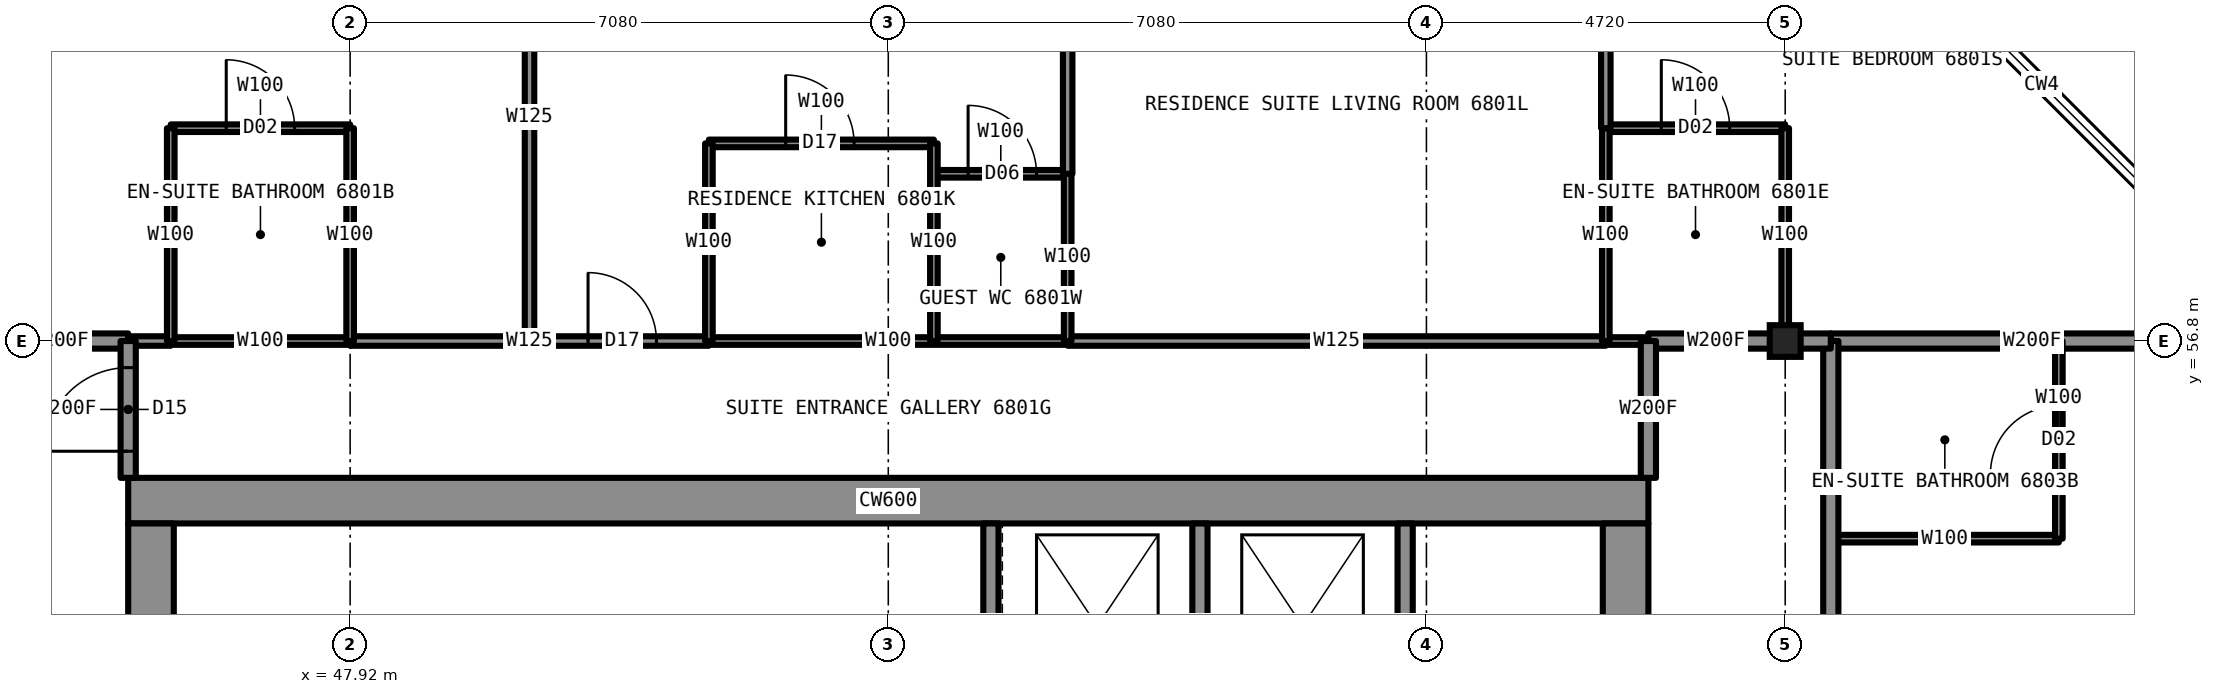
"""IFC4 building model, lengths in metres.
Left out: names, types, materials, properties, quantities, classifications, styles, units other than length and angle.
Written with IfcOpenShell. Run it as: python <this file> out.ifc"""

import sys

from ifc_helpers import new_model, si_unit, direction, frame, frame_2d, origin, origin_2d, place, context, subcontext, project, spatial, rectangle, i_section, extrude, element, fill, save


model = new_model("IFC4")
c1 = context("Model", 3, precision=1e-05, world=origin(), true_north=direction((0.0, 1.0)))
c2 = subcontext(c1, "Body", "Model", "MODEL_VIEW")
j1 = project(units=[si_unit("LENGTHUNIT", "METRE"), si_unit("PLANEANGLEUNIT", "RADIAN")], contexts=[c1])
p1 = place(None, origin())
s1 = spatial("IfcSite", under=j1, at=p1, CompositionType="ELEMENT")
p2 = place(p1, origin())
s2 = spatial("IfcBuilding", under=s1, at=p2, CompositionType="ELEMENT")
p3 = place(p2, frame((0.0, 0.0, 247.7)))
s3 = spatial("IfcBuildingStorey", under=s2, at=p3, CompositionType="ELEMENT", Elevation=247.7)
p4 = place(p3, frame((66.8, 56.8, 0.0), z_axis=(0.0, 0.0, 1.0), x_axis=(1.0, 0.0, 0.0)))
e1 = element("IfcColumn", 1, at=p4, inside=s3, PredefinedType="COLUMN", context=c2, shape_type="SweptSolid", body=[
    extrude(i_section(OverallWidth=0.406, OverallDepth=0.417, WebThickness=0.03, FlangeThickness=0.048, at=origin_2d()), origin(), (0.0, 0.0, 1.0), 3.5),
])
p5 = place(p3, frame((45.0, 54.7, 0.0), z_axis=(0.0, 0.0, 1.0), x_axis=(1.0, 0.0, 0.0)))
e2 = element("IfcWall", 2, at=p5, inside=s3, PredefinedType="SHEAR", context=c2, shape_type="SweptSolid", body=[
    extrude(rectangle(XDim=20.0, YDim=0.6, at=frame_2d((10.0, 0.0))), origin(), (0.0, 0.0, 1.0), 3.5),
])
p6 = place(p3, frame((64.7, 35.6, 0.0), z_axis=(0.0, 0.0, 1.0), x_axis=(0.0, 1.0, 0.0)))
e3 = element("IfcWall", 3, at=p6, inside=s3, PredefinedType="SHEAR", context=c2, shape_type="SweptSolid", body=[
    extrude(rectangle(XDim=18.8, YDim=0.6, at=frame_2d((9.4, 0.0))), origin(), (0.0, 0.0, 1.0), 3.5),
])
p7 = place(p6, frame((13.4, 0.0, 0.0)))
e4 = element("IfcOpeningElement", 4, at=p7, cuts=e3, PredefinedType="OPENING", context=c2, shape_type="SweptSolid", body=[
    extrude(rectangle(XDim=1.8, YDim=2.2, at=frame_2d((0.9, 1.1))), frame((0.0, 0.31, 0.0), z_axis=(0.0, -1.0, 0.0), x_axis=(1.0, 0.0, 0.0)), (0.0, 0.0, 1.0), 0.62),
])
p8 = place(p6, frame((3.6, 0.0, 0.0)))
e5 = element("IfcOpeningElement", 5, at=p8, cuts=e3, PredefinedType="OPENING", context=c2, shape_type="SweptSolid", body=[
    extrude(rectangle(XDim=1.8, YDim=2.2, at=frame_2d((0.9, 1.1))), frame((0.0, 0.31, 0.0), z_axis=(0.0, -1.0, 0.0), x_axis=(1.0, 0.0, 0.0)), (0.0, 0.0, 1.0), 0.62),
])
p9 = place(p3, frame((45.3, 35.6, 0.0), z_axis=(0.0, 0.0, 1.0), x_axis=(0.0, 1.0, 0.0)))
e6 = element("IfcWall", 6, at=p9, inside=s3, PredefinedType="SHEAR", context=c2, shape_type="SweptSolid", body=[
    extrude(rectangle(XDim=18.8, YDim=0.6, at=frame_2d((9.4, 0.0))), origin(), (0.0, 0.0, 1.0), 3.5),
])
p10 = place(p9, frame((13.4, 0.0, 0.0)))
e7 = element("IfcOpeningElement", 7, at=p10, cuts=e6, PredefinedType="OPENING", context=c2, shape_type="SweptSolid", body=[
    extrude(rectangle(XDim=1.8, YDim=2.2, at=frame_2d((0.9, 1.1))), frame((0.0, 0.31, 0.0), z_axis=(0.0, -1.0, 0.0), x_axis=(1.0, 0.0, 0.0)), (0.0, 0.0, 1.0), 0.62),
])
p11 = place(p9, frame((3.6, 0.0, 0.0)))
e8 = element("IfcOpeningElement", 8, at=p11, cuts=e6, PredefinedType="OPENING", context=c2, shape_type="SweptSolid", body=[
    extrude(rectangle(XDim=1.8, YDim=2.2, at=frame_2d((0.9, 1.1))), frame((0.0, 0.31, 0.0), z_axis=(0.0, -1.0, 0.0), x_axis=(1.0, 0.0, 0.0)), (0.0, 0.0, 1.0), 0.62),
])
p12 = place(p9, frame((6.4, 0.0, 0.0)))
e9 = element("IfcOpeningElement", 9, at=p12, cuts=e6, PredefinedType="OPENING", context=c2, shape_type="SweptSolid", body=[
    extrude(rectangle(XDim=1.2, YDim=2.2, at=frame_2d((0.6, 1.1))), frame((0.0, 0.31, 0.0), z_axis=(0.0, -1.0, 0.0), x_axis=(1.0, 0.0, 0.0)), (0.0, 0.0, 1.0), 0.62),
])
p13 = place(p3, frame((45.56, 56.8, 0.0), z_axis=(0.0, 0.0, 1.0), x_axis=(1.0, 0.0, 0.0)))
e10 = element("IfcWall", 10, at=p13, inside=s3, PredefinedType="PARTITIONING", context=c2, shape_type="SweptSolid", body=[
    extrude(rectangle(XDim=2.36, YDim=0.1, at=frame_2d((1.18, 0.0))), origin(), (0.0, 0.0, 1.0), 3.33),
])
p14 = place(p3, frame((52.64, 56.8, 0.0), z_axis=(0.0, 0.0, 1.0), x_axis=(1.0, 0.0, 0.0)))
e11 = element("IfcWall", 11, at=p14, inside=s3, PredefinedType="PARTITIONING", context=c2, shape_type="SweptSolid", body=[
    extrude(rectangle(XDim=4.72, YDim=0.1, at=frame_2d((2.36, 0.0))), origin(), (0.0, 0.0, 1.0), 3.33),
])
p15 = place(p3, frame((64.44, 56.8, 0.0), z_axis=(0.0, 0.0, 1.0), x_axis=(1.0, 0.0, 0.0)))
e12 = element("IfcWall", 12, at=p15, inside=s3, PredefinedType="PARTITIONING", context=c2, shape_type="SweptSolid", body=[
    extrude(rectangle(XDim=0.56, YDim=0.1, at=frame_2d((0.28, 0.0))), origin(), (0.0, 0.0, 1.0), 3.33),
])
p16 = place(p3, frame((43.2, 56.8, 0.0), z_axis=(0.0, 0.0, 1.0), x_axis=(1.0, 0.0, 0.0)))
e13 = element("IfcWall", 13, at=p16, inside=s3, PredefinedType="PARTITIONING", context=c2, shape_type="SweptSolid", body=[
    extrude(rectangle(XDim=1.8, YDim=0.2, at=frame_2d((0.9, 0.0))), origin(), (0.0, 0.0, 1.0), 3.33),
])
p17 = place(p3, frame((65.0, 56.8, 0.0), z_axis=(0.0, 0.0, 1.0), x_axis=(1.0, 0.0, 0.0)))
e14 = element("IfcWall", 14, at=p17, inside=s3, PredefinedType="PARTITIONING", context=c2, shape_type="SweptSolid", body=[
    extrude(rectangle(XDim=1.78, YDim=0.2, at=frame_2d((0.89, 0.0))), origin(), (0.0, 0.0, 1.0), 3.33),
])
p18 = place(p3, frame((67.4, 56.8, 0.0), z_axis=(0.0, 0.0, 1.0), x_axis=(1.0, 0.0, 0.0)))
e15 = element("IfcWall", 15, at=p18, inside=s3, PredefinedType="PARTITIONING", context=c2, shape_type="SweptSolid", body=[
    extrude(rectangle(XDim=5.3, YDim=0.2, at=frame_2d((2.65, 0.0))), origin(), (0.0, 0.0, 1.0), 2.573),
])
p19 = place(p3, frame((45.0, 56.8, 0.0), z_axis=(0.0, 0.0, 1.0), x_axis=(1.0, 0.0, 0.0)))
e16 = element("IfcWall", 16, at=p19, inside=s3, PredefinedType="PARTITIONING", context=c2, shape_type="SweptSolid", body=[
    extrude(rectangle(XDim=0.56, YDim=0.125, at=frame_2d((0.28, 0.0))), origin(), (0.0, 0.0, 1.0), 3.33),
])
p20 = place(p3, frame((47.92, 56.8, 0.0), z_axis=(0.0, 0.0, 1.0), x_axis=(1.0, 0.0, 0.0)))
e17 = element("IfcWall", 17, at=p20, inside=s3, PredefinedType="PARTITIONING", context=c2, shape_type="SweptSolid", body=[
    extrude(rectangle(XDim=4.72, YDim=0.125, at=frame_2d((2.36, 0.0))), origin(), (0.0, 0.0, 1.0), 3.33),
])
p21 = place(p20, frame((3.13, 0.0, 0.0)))
e18 = element("IfcOpeningElement", 18, at=p21, cuts=e17, PredefinedType="OPENING", context=c2, shape_type="SweptSolid", body=[
    extrude(rectangle(XDim=0.9, YDim=2.2, at=frame_2d((0.45, 1.1))), frame((0.0, 0.073, 0.0), z_axis=(0.0, -1.0, 0.0), x_axis=(1.0, 0.0, 0.0)), (0.0, 0.0, 1.0), 0.145),
])
p22 = place(p3, frame((57.36, 56.8, 0.0), z_axis=(0.0, 0.0, 1.0), x_axis=(1.0, 0.0, 0.0)))
e19 = element("IfcWall", 19, at=p22, inside=s3, PredefinedType="PARTITIONING", context=c2, shape_type="SweptSolid", body=[
    extrude(rectangle(XDim=7.08, YDim=0.125, at=frame_2d((3.54, 0.0))), origin(), (0.0, 0.0, 1.0), 3.33),
])
p23 = place(p3, frame((55.6, 59.0, 0.0), z_axis=(0.0, 0.0, 1.0), x_axis=(1.0, 0.0, 0.0)))
e20 = element("IfcWall", 20, at=p23, inside=s3, PredefinedType="PARTITIONING", context=c2, shape_type="SweptSolid", body=[
    extrude(rectangle(XDim=1.76, YDim=0.1, at=frame_2d((0.88, 0.0))), origin(), (0.0, 0.0, 1.0), 3.33),
])
p24 = place(p23, frame((0.45, 0.0, 0.0)))
e21 = element("IfcOpeningElement", 21, at=p24, cuts=e20, PredefinedType="OPENING", context=c2, shape_type="SweptSolid", body=[
    extrude(rectangle(XDim=0.9, YDim=2.1, at=frame_2d((0.45, 1.05))), frame((0.0, 0.06, 0.0), z_axis=(0.0, -1.0, 0.0), x_axis=(1.0, 0.0, 0.0)), (0.0, 0.0, 1.0), 0.12),
])
p25 = place(p3, frame((52.64, 59.4, 0.0), z_axis=(0.0, 0.0, 1.0), x_axis=(1.0, 0.0, 0.0)))
e22 = element("IfcWall", 22, at=p25, inside=s3, PredefinedType="PARTITIONING", context=c2, shape_type="SweptSolid", body=[
    extrude(rectangle(XDim=2.96, YDim=0.1, at=frame_2d((1.48, 0.0))), origin(), (0.0, 0.0, 1.0), 3.33),
])
p26 = place(p25, frame((1.01, 0.0, 0.0)))
e23 = element("IfcOpeningElement", 23, at=p26, cuts=e22, PredefinedType="OPENING", context=c2, shape_type="SweptSolid", body=[
    extrude(rectangle(XDim=0.9, YDim=2.2, at=frame_2d((0.45, 1.1))), frame((0.0, 0.06, 0.0), z_axis=(0.0, -1.0, 0.0), x_axis=(1.0, 0.0, 0.0)), (0.0, 0.0, 1.0), 0.12),
])
p27 = place(p3, frame((45.56, 59.6, 0.0), z_axis=(0.0, 0.0, 1.0), x_axis=(1.0, 0.0, 0.0)))
e24 = element("IfcWall", 24, at=p27, inside=s3, PredefinedType="PARTITIONING", context=c2, shape_type="SweptSolid", body=[
    extrude(rectangle(XDim=2.36, YDim=0.1, at=frame_2d((1.18, 0.0))), origin(), (0.0, 0.0, 1.0), 3.33),
])
p28 = place(p27, frame((0.73, 0.0, 0.0)))
e25 = element("IfcOpeningElement", 25, at=p28, cuts=e24, PredefinedType="OPENING", context=c2, shape_type="SweptSolid", body=[
    extrude(rectangle(XDim=0.9, YDim=2.1, at=frame_2d((0.45, 1.05))), frame((0.0, 0.06, 0.0), z_axis=(0.0, -1.0, 0.0), x_axis=(1.0, 0.0, 0.0)), (0.0, 0.0, 1.0), 0.12),
])
p29 = place(p3, frame((64.44, 59.6, 0.0), z_axis=(0.0, 0.0, 1.0), x_axis=(1.0, 0.0, 0.0)))
e26 = element("IfcWall", 26, at=p29, inside=s3, PredefinedType="PARTITIONING", context=c2, shape_type="SweptSolid", body=[
    extrude(rectangle(XDim=2.36, YDim=0.1, at=frame_2d((1.18, 0.0))), origin(), (0.0, 0.0, 1.0), 3.33),
])
p30 = place(p29, frame((0.73, 0.0, 0.0)))
e27 = element("IfcOpeningElement", 27, at=p30, cuts=e26, PredefinedType="OPENING", context=c2, shape_type="SweptSolid", body=[
    extrude(rectangle(XDim=0.9, YDim=2.1, at=frame_2d((0.45, 1.05))), frame((0.0, 0.06, 0.0), z_axis=(0.0, -1.0, 0.0), x_axis=(1.0, 0.0, 0.0)), (0.0, 0.0, 1.0), 0.12),
])
p31 = place(p3, frame((67.4, 54.2, 0.0), z_axis=(0.0, 0.0, 1.0), x_axis=(1.0, 0.0, 0.0)))
e28 = element("IfcWall", 28, at=p31, inside=s3, PredefinedType="PARTITIONING", context=c2, shape_type="SweptSolid", body=[
    extrude(rectangle(XDim=3.0, YDim=0.1, at=frame_2d((1.5, 0.0))), origin(), (0.0, 0.0, 1.0), 3.33),
])
p32 = place(p3, frame((45.0, 55.0, 0.0), z_axis=(0.0, 0.0, 1.0), x_axis=(0.0, 1.0, 0.0)))
e29 = element("IfcWall", 29, at=p32, inside=s3, PredefinedType="PARTITIONING", context=c2, shape_type="SweptSolid", body=[
    extrude(rectangle(XDim=1.8, YDim=0.2, at=frame_2d((0.9, 0.0))), origin(), (0.0, 0.0, 1.0), 3.33),
])
p33 = place(p32, frame((0.35, 0.0, 0.0)))
e30 = element("IfcOpeningElement", 30, at=p33, cuts=e29, PredefinedType="OPENING", context=c2, shape_type="SweptSolid", body=[
    extrude(rectangle(XDim=1.1, YDim=2.2, at=frame_2d((0.55, 1.1))), frame((0.0, 0.11, 0.0), z_axis=(0.0, -1.0, 0.0), x_axis=(1.0, 0.0, 0.0)), (0.0, 0.0, 1.0), 0.22),
])
p34 = place(p3, frame((52.64, 56.8, 0.0), z_axis=(0.0, 0.0, 1.0), x_axis=(0.0, 1.0, 0.0)))
e31 = element("IfcWall", 31, at=p34, inside=s3, PredefinedType="PARTITIONING", context=c2, shape_type="SweptSolid", body=[
    extrude(rectangle(XDim=2.6, YDim=0.1, at=frame_2d((1.3, 0.0))), origin(), (0.0, 0.0, 1.0), 3.33),
])
p35 = place(p3, frame((50.28, 56.8, 0.0), z_axis=(0.0, 0.0, 1.0), x_axis=(0.0, 1.0, 0.0)))
e32 = element("IfcWall", 32, at=p35, inside=s3, PredefinedType="PARTITIONING", context=c2, shape_type="SweptSolid", body=[
    extrude(rectangle(XDim=5.9, YDim=0.125, at=frame_2d((2.95, 0.0))), origin(), (0.0, 0.0, 1.0), 3.33),
])
p36 = place(p35, frame((4.05, 0.0, 0.0)))
e33 = element("IfcOpeningElement", 33, at=p36, cuts=e32, PredefinedType="OPENING", context=c2, shape_type="SweptSolid", body=[
    extrude(rectangle(XDim=0.9, YDim=2.2, at=frame_2d((0.45, 1.1))), frame((0.0, 0.073, 0.0), z_axis=(0.0, -1.0, 0.0), x_axis=(1.0, 0.0, 0.0)), (0.0, 0.0, 1.0), 0.145),
])
p37 = place(p3, frame((47.92, 56.8, 0.0), z_axis=(0.0, 0.0, 1.0), x_axis=(0.0, 1.0, 0.0)))
e34 = element("IfcWall", 34, at=p37, inside=s3, PredefinedType="PARTITIONING", context=c2, shape_type="SweptSolid", body=[
    extrude(rectangle(XDim=2.8, YDim=0.1, at=frame_2d((1.4, 0.0))), origin(), (0.0, 0.0, 1.0), 2.573),
])
p38 = place(p3, frame((45.56, 56.8, 0.0), z_axis=(0.0, 0.0, 1.0), x_axis=(0.0, 1.0, 0.0)))
e35 = element("IfcWall", 35, at=p38, inside=s3, PredefinedType="PARTITIONING", context=c2, shape_type="SweptSolid", body=[
    extrude(rectangle(XDim=2.8, YDim=0.1, at=frame_2d((1.4, 0.0))), origin(), (0.0, 0.0, 1.0), 3.33),
])
p39 = place(p3, frame((55.6, 56.8, 0.0), z_axis=(0.0, 0.0, 1.0), x_axis=(0.0, 1.0, 0.0)))
e36 = element("IfcWall", 36, at=p39, inside=s3, PredefinedType="PARTITIONING", context=c2, shape_type="SweptSolid", body=[
    extrude(rectangle(XDim=2.6, YDim=0.1, at=frame_2d((1.3, 0.0))), origin(), (0.0, 0.0, 1.0), 3.33),
])
p40 = place(p3, frame((65.0, 55.0, 0.0), z_axis=(0.0, 0.0, 1.0), x_axis=(0.0, 1.0, 0.0)))
e37 = element("IfcWall", 37, at=p40, inside=s3, PredefinedType="PARTITIONING", context=c2, shape_type="SweptSolid", body=[
    extrude(rectangle(XDim=1.8, YDim=0.2, at=frame_2d((0.9, 0.0))), origin(), (0.0, 0.0, 1.0), 3.33),
])
p41 = place(p3, frame((66.8, 56.8, 0.0), z_axis=(0.0, 0.0, 1.0), x_axis=(0.0, 1.0, 0.0)))
e38 = element("IfcWall", 38, at=p41, inside=s3, PredefinedType="PARTITIONING", context=c2, shape_type="SweptSolid", body=[
    extrude(rectangle(XDim=2.8, YDim=0.1, at=frame_2d((1.4, 0.0))), origin(), (0.0, 0.0, 1.0), 2.573),
])
p42 = place(p3, frame((67.4, 33.2, 0.0), z_axis=(0.0, 0.0, 1.0), x_axis=(0.0, 1.0, 0.0)))
e39 = element("IfcWall", 39, at=p42, inside=s3, PredefinedType="PARTITIONING", context=c2, shape_type="SweptSolid", body=[
    extrude(rectangle(XDim=23.6, YDim=0.2, at=frame_2d((11.8, 0.0))), origin(), (0.0, 0.0, 1.0), 3.33),
])
p43 = place(p42, frame((8.95, 0.0, 0.0)))
e40 = element("IfcOpeningElement", 40, at=p43, cuts=e39, PredefinedType="OPENING", context=c2, shape_type="SweptSolid", body=[
    extrude(rectangle(XDim=1.1, YDim=2.2, at=frame_2d((0.55, 1.1))), frame((0.0, 0.11, 0.0), z_axis=(0.0, -1.0, 0.0), x_axis=(1.0, 0.0, 0.0)), (0.0, 0.0, 1.0), 0.22),
])
p44 = place(p42, frame((0.7, 0.0, 0.0)))
e41 = element("IfcOpeningElement", 41, at=p44, cuts=e39, PredefinedType="OPENING", context=c2, shape_type="SweptSolid", body=[
    extrude(rectangle(XDim=1.0, YDim=2.1, at=frame_2d((0.5, 1.05))), frame((0.0, 0.11, 0.0), z_axis=(0.0, -1.0, 0.0), x_axis=(1.0, 0.0, 0.0)), (0.0, 0.0, 1.0), 0.22),
])
p45 = place(p3, frame((70.4, 54.2, 0.0), z_axis=(0.0, 0.0, 1.0), x_axis=(0.0, 1.0, 0.0)))
e42 = element("IfcWall", 42, at=p45, inside=s3, PredefinedType="PARTITIONING", context=c2, shape_type="SweptSolid", body=[
    extrude(rectangle(XDim=2.6, YDim=0.1, at=frame_2d((1.3, 0.0))), origin(), (0.0, 0.0, 1.0), 3.33),
])
p46 = place(p45, frame((0.85, 0.0, 0.0)))
e43 = element("IfcOpeningElement", 43, at=p46, cuts=e42, PredefinedType="OPENING", context=c2, shape_type="SweptSolid", body=[
    extrude(rectangle(XDim=0.9, YDim=2.1, at=frame_2d((0.45, 1.05))), frame((0.0, 0.06, 0.0), z_axis=(0.0, -1.0, 0.0), x_axis=(1.0, 0.0, 0.0)), (0.0, 0.0, 1.0), 0.12),
])
p47 = place(p3, frame((57.36, 56.8, 0.0), z_axis=(0.0, 0.0, 1.0), x_axis=(0.0, 1.0, 0.0)))
e44 = element("IfcWall", 44, at=p47, inside=s3, PredefinedType="PARTITIONING", context=c2, shape_type="SweptSolid", body=[
    extrude(rectangle(XDim=2.2, YDim=0.1, at=frame_2d((1.1, 0.0))), origin(), (0.0, 0.0, 1.0), 3.33),
])
p48 = place(p3, frame((57.36, 59.0, 0.0), z_axis=(0.0, 0.0, 1.0), x_axis=(0.0, 1.0, 0.0)))
e45 = element("IfcWall", 45, at=p48, inside=s3, PredefinedType="PARTITIONING", context=c2, shape_type="SweptSolid", body=[
    extrude(rectangle(XDim=3.7, YDim=0.125, at=frame_2d((1.85, 0.0))), origin(), (0.0, 0.0, 1.0), 3.33),
])
p49 = place(p48, frame((1.85, 0.0, 0.0)))
e46 = element("IfcOpeningElement", 46, at=p49, cuts=e45, PredefinedType="OPENING", context=c2, shape_type="SweptSolid", body=[
    extrude(rectangle(XDim=0.9, YDim=2.2, at=frame_2d((0.45, 1.1))), frame((0.0, 0.073, 0.0), z_axis=(0.0, -1.0, 0.0), x_axis=(1.0, 0.0, 0.0)), (0.0, 0.0, 1.0), 0.145),
])
p50 = place(p3, frame((64.44, 56.8, 0.0), z_axis=(0.0, 0.0, 1.0), x_axis=(0.0, 1.0, 0.0)))
e47 = element("IfcWall", 47, at=p50, inside=s3, PredefinedType="PARTITIONING", context=c2, shape_type="SweptSolid", body=[
    extrude(rectangle(XDim=2.8, YDim=0.1, at=frame_2d((1.4, 0.0))), origin(), (0.0, 0.0, 1.0), 3.33),
])
p51 = place(p3, frame((64.44, 59.6, 0.0), z_axis=(0.0, 0.0, 1.0), x_axis=(0.0, 1.0, 0.0)))
e48 = element("IfcWall", 48, at=p51, inside=s3, PredefinedType="PARTITIONING", context=c2, shape_type="SweptSolid", body=[
    extrude(rectangle(XDim=3.1, YDim=0.125, at=frame_2d((1.55, 0.0))), origin(), (0.0, 0.0, 1.0), 3.33),
])
p52 = place(p51, frame((1.25, 0.0, 0.0)))
e49 = element("IfcOpeningElement", 49, at=p52, cuts=e48, PredefinedType="OPENING", context=c2, shape_type="SweptSolid", body=[
    extrude(rectangle(XDim=0.9, YDim=2.2, at=frame_2d((0.45, 1.1))), frame((0.0, 0.073, 0.0), z_axis=(0.0, -1.0, 0.0), x_axis=(1.0, 0.0, 0.0)), (0.0, 0.0, 1.0), 0.145),
])
for number, where, z_axis, x_axis in (
    (50, (59.1, 51.7, 0.0), (0.0, 0.0, 1.0), (0.0, 1.0, 0.0)),
    (51, (61.8, 51.7, 0.0), (0.0, 0.0, 1.0), (0.0, 1.0, 0.0)),
    (52, (56.35, 51.7, 0.0), (0.0, 0.0, 1.0), (0.0, 1.0, 0.0)),
):
    element("IfcWall", number, at=place(p3, frame(where, z_axis=z_axis, x_axis=x_axis)), inside=s3, PredefinedType="PARTITIONING", context=c2, shape_type="SweptSolid", body=[
        extrude(rectangle(XDim=2.7, YDim=0.2, at=frame_2d((1.35, 0.0))), origin(), (0.0, 0.0, 1.0), 3.33),
    ])
p53 = place(p3, frame((66.78, 56.8, 0.0), z_axis=(0.0, 0.0, 1.0), x_axis=(1.0, 0.0, 0.0)))
e53 = element("IfcWall", 53, at=p53, inside=s3, PredefinedType="PARTITIONING", context=c2, shape_type="SweptSolid", body=[
    extrude(rectangle(XDim=0.62, YDim=0.2, at=frame_2d((0.31, 0.0))), origin(), (0.0, 0.0, 1.0), 2.573),
])
p54 = place(p21, origin())
e54 = element("IfcDoor", 54, at=p54, inside=s3, OperationType="SINGLE_SWING_LEFT", PredefinedType="DOOR", context=c2, shape_type="SweptSolid", body=[
    extrude(rectangle(XDim=0.9, YDim=2.2, at=frame_2d((0.45, 1.1))), frame((0.0, 0.025, 0.0), z_axis=(0.0, -1.0, 0.0), x_axis=(1.0, 0.0, 0.0)), (0.0, 0.0, 1.0), 0.05),
])
fill(e18, e54)
p55 = place(p28, origin())
e55 = element("IfcDoor", 55, at=p55, inside=s3, OperationType="SINGLE_SWING_RIGHT", PredefinedType="DOOR", context=c2, shape_type="SweptSolid", body=[
    extrude(rectangle(XDim=0.9, YDim=2.1, at=frame_2d((0.45, 1.05))), frame((0.0, 0.025, 0.0), z_axis=(0.0, -1.0, 0.0), x_axis=(1.0, 0.0, 0.0)), (0.0, 0.0, 1.0), 0.05),
])
fill(e25, e55)
p56 = place(p30, origin())
e56 = element("IfcDoor", 56, at=p56, inside=s3, OperationType="SINGLE_SWING_RIGHT", PredefinedType="DOOR", context=c2, shape_type="SweptSolid", body=[
    extrude(rectangle(XDim=0.9, YDim=2.1, at=frame_2d((0.45, 1.05))), frame((0.0, 0.025, 0.0), z_axis=(0.0, -1.0, 0.0), x_axis=(1.0, 0.0, 0.0)), (0.0, 0.0, 1.0), 0.05),
])
fill(e27, e56)
p57 = place(p33, origin())
e57 = element("IfcDoor", 57, at=p57, inside=s3, OperationType="SINGLE_SWING_LEFT", PredefinedType="DOOR", context=c2, shape_type="SweptSolid", body=[
    extrude(rectangle(XDim=1.1, YDim=2.2, at=frame_2d((0.55, 1.1))), frame((0.0, 0.025, 0.0), z_axis=(0.0, -1.0, 0.0), x_axis=(1.0, 0.0, 0.0)), (0.0, 0.0, 1.0), 0.05),
])
fill(e30, e57)
p58 = place(p26, origin())
e58 = element("IfcDoor", 58, at=p58, inside=s3, OperationType="SINGLE_SWING_LEFT", PredefinedType="DOOR", context=c2, shape_type="SweptSolid", body=[
    extrude(rectangle(XDim=0.9, YDim=2.2, at=frame_2d((0.45, 1.1))), frame((0.0, 0.025, 0.0), z_axis=(0.0, -1.0, 0.0), x_axis=(1.0, 0.0, 0.0)), (0.0, 0.0, 1.0), 0.05),
])
fill(e23, e58)
p59 = place(p24, origin())
e59 = element("IfcDoor", 59, at=p59, inside=s3, OperationType="SINGLE_SWING_LEFT", PredefinedType="DOOR", context=c2, shape_type="SweptSolid", body=[
    extrude(rectangle(XDim=0.9, YDim=2.1, at=frame_2d((0.45, 1.05))), frame((0.0, 0.025, 0.0), z_axis=(0.0, -1.0, 0.0), x_axis=(1.0, 0.0, 0.0)), (0.0, 0.0, 1.0), 0.05),
])
fill(e21, e59)
p60 = place(p46, origin())
e60 = element("IfcDoor", 60, at=p60, inside=s3, OperationType="SINGLE_SWING_RIGHT", PredefinedType="DOOR", context=c2, shape_type="SweptSolid", body=[
    extrude(rectangle(XDim=0.9, YDim=2.1, at=frame_2d((0.45, 1.05))), frame((0.0, 0.025, 0.0), z_axis=(0.0, -1.0, 0.0), x_axis=(1.0, 0.0, 0.0)), (0.0, 0.0, 1.0), 0.05),
])
fill(e43, e60)
save(model, sys.argv[1])
